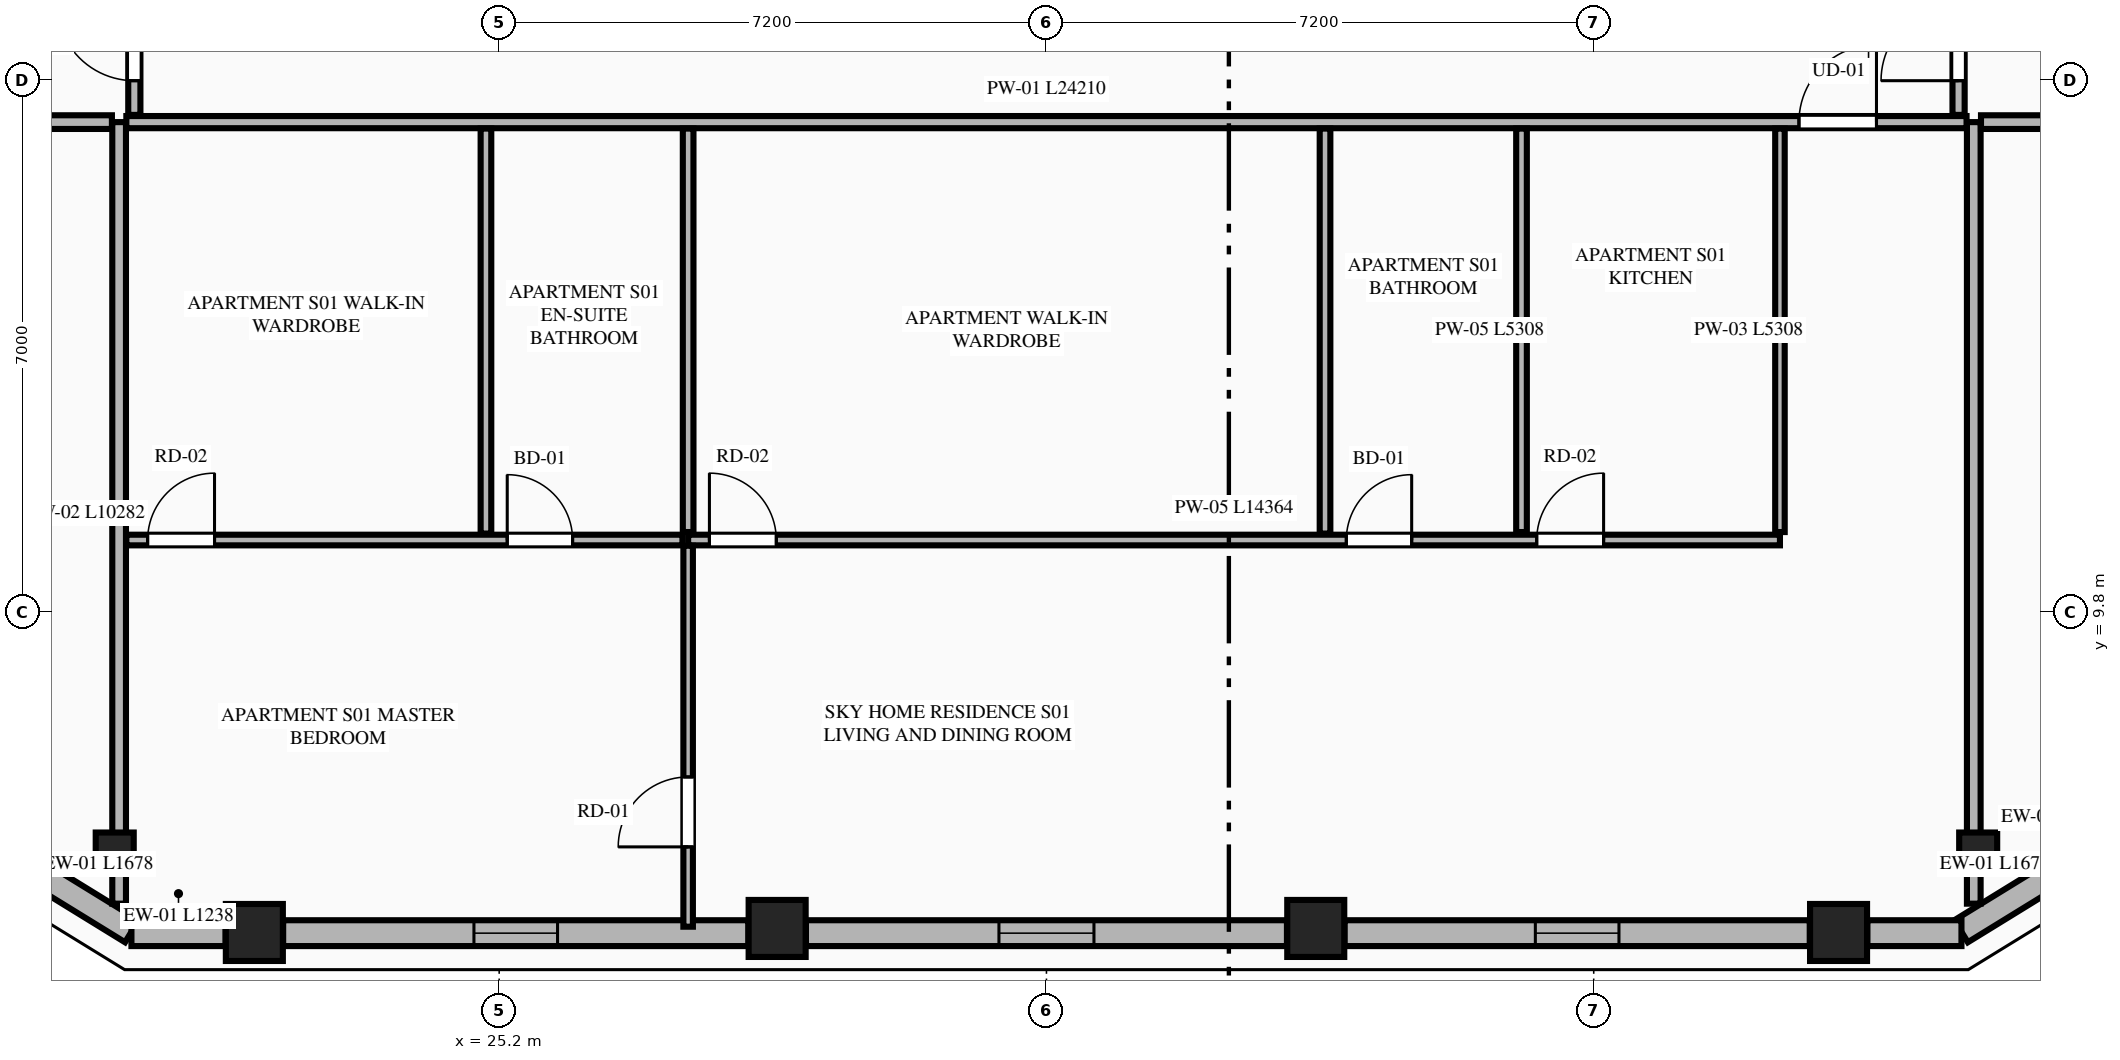
"""IFC4 building model, lengths in metres.
Left out: names, types, materials, properties, quantities, classifications, styles, units other than length and angle.
Written with IfcOpenShell. Run it as: python <this file> out.ifc"""

import sys

from ifc_helpers import new_model, si_unit, direction, frame, frame_2d, origin, origin_2d, place, context, subcontext, project, spatial, rectangle, extrude, element, fill, save


model = new_model("IFC4")
c1 = context("Model", 3, precision=1e-05, world=origin(), true_north=direction((0.0, 1.0)))
c2 = subcontext(c1, "Body", "Model", "MODEL_VIEW")
j1 = project(units=[si_unit("LENGTHUNIT", "METRE"), si_unit("PLANEANGLEUNIT", "RADIAN")], contexts=[c1])
p1 = place(None, origin())
s1 = spatial("IfcSite", under=j1, at=p1, CompositionType="ELEMENT")
p2 = place(p1, origin())
s2 = spatial("IfcBuilding", under=s1, at=p2, CompositionType="ELEMENT")
p3 = place(p2, frame((0.0, 0.0, 210.95)))
s3 = spatial("IfcBuildingStorey", under=s2, at=p3, CompositionType="ELEMENT", Elevation=210.95)
for number, where, z_axis, x_axis in (
    (1, (21.979, 5.589, 0.0), (0.0, 0.0, 1.0), (1.0, 0.0, 0.0)),
    (2, (28.857, 5.642, 0.0), (0.0, 0.0, 1.0), (1.0, 0.0, 0.0)),
    (3, (35.943, 5.642, 0.0), (0.0, 0.0, 1.0), (1.0, 0.0, 0.0)),
    (4, (42.821, 5.589, 0.0), (0.0, 0.0, 1.0), (1.0, 0.0, 0.0)),
):
    element("IfcColumn", number, at=place(p3, frame(where, z_axis=z_axis, x_axis=x_axis)), inside=s3, PredefinedType="COLUMN", context=c2, shape_type="SweptSolid", body=[
        extrude(rectangle(XDim=0.75, YDim=0.75, at=origin_2d()), origin(), (0.0, 0.0, 1.0), 3.55),
    ])
for number, where, z_axis, x_axis in (
    (5, (20.142, 6.654, 0.0), (0.0, 0.0, 1.0), (0.865, -0.501, 0.0)),
    (6, (44.658, 6.654, 0.0), (0.0, 0.0, 1.0), (0.865, 0.501, 0.0)),
):
    element("IfcColumn", number, at=place(p3, frame(where, z_axis=z_axis, x_axis=x_axis)), inside=s3, PredefinedType="PILASTER", context=c2, shape_type="SweptSolid", body=[
        extrude(rectangle(XDim=0.5, YDim=0.35, at=origin_2d()), origin(), (0.0, 0.0, 1.0), 3.55),
    ])
for number, where, z_axis, x_axis in (
    (7, (18.938, 6.484, 0.0), (0.0, 0.0, 1.0), (0.852, -0.524, 0.0)),
    (8, (44.433, 5.605, 0.0), (0.0, 0.0, 1.0), (0.852, 0.524, 0.0)),
):
    element("IfcWall", number, at=place(p3, frame(where, z_axis=z_axis, x_axis=x_axis)), inside=s3, PredefinedType="STANDARD", context=c2, shape_type="SweptSolid", body=[
        extrude(rectangle(XDim=1.678, YDim=0.34, at=frame_2d((0.839, 0.0))), origin(), (0.0, 0.0, 1.0), 3.35),
    ])
p4 = place(p3, frame((20.362, 5.58, 0.0), z_axis=(0.0, 0.0, 1.0), x_axis=(1.0, 0.0, 0.0)))
e9 = element("IfcWall", 9, at=p4, inside=s3, PredefinedType="STANDARD", context=c2, shape_type="SweptSolid", body=[
    extrude(rectangle(XDim=1.238, YDim=0.34, at=frame_2d((0.619, 0.0))), origin(), (0.0, 0.0, 1.0), 3.35),
])
p5 = place(p3, frame((22.358, 5.58, 0.0), z_axis=(0.0, 0.0, 1.0), x_axis=(1.0, 0.0, 0.0)))
e10 = element("IfcWall", 10, at=p5, inside=s3, PredefinedType="STANDARD", context=c2, shape_type="SweptSolid", body=[
    extrude(rectangle(XDim=6.12, YDim=0.34, at=frame_2d((3.06, 0.0))), origin(), (0.0, 0.0, 1.0), 2.883),
])
p6 = place(p5, frame((2.51, 0.0, 0.75)))
e11 = element("IfcOpeningElement", 11, at=p6, cuts=e10, PredefinedType="OPENING", context=c2, shape_type="SweptSolid", body=[
    extrude(rectangle(XDim=1.1, YDim=1.983, at=frame_2d((0.55, 0.991))), frame((0.0, 0.18, 0.0), z_axis=(0.0, -1.0, 0.0), x_axis=(1.0, 0.0, 0.0)), (0.0, 0.0, 1.0), 0.36),
])
p7 = place(p3, frame((29.236, 5.58, 0.0), z_axis=(0.0, 0.0, 1.0), x_axis=(1.0, 0.0, 0.0)))
e12 = element("IfcWall", 12, at=p7, inside=s3, PredefinedType="STANDARD", context=c2, shape_type="SweptSolid", body=[
    extrude(rectangle(XDim=6.328, YDim=0.34, at=frame_2d((3.164, 0.0))), origin(), (0.0, 0.0, 1.0), 2.883),
])
p8 = place(p7, frame((2.539, 0.0, 0.75)))
e13 = element("IfcOpeningElement", 13, at=p8, cuts=e12, PredefinedType="OPENING", context=c2, shape_type="SweptSolid", body=[
    extrude(rectangle(XDim=1.25, YDim=1.95, at=frame_2d((0.625, 0.975))), frame((0.0, 0.18, 0.0), z_axis=(0.0, -1.0, 0.0), x_axis=(1.0, 0.0, 0.0)), (0.0, 0.0, 1.0), 0.36),
])
p9 = place(p3, frame((36.322, 5.58, 0.0), z_axis=(0.0, 0.0, 1.0), x_axis=(1.0, 0.0, 0.0)))
e14 = element("IfcWall", 14, at=p9, inside=s3, PredefinedType="STANDARD", context=c2, shape_type="SweptSolid", body=[
    extrude(rectangle(XDim=6.12, YDim=0.34, at=frame_2d((3.06, 0.0))), origin(), (0.0, 0.0, 1.0), 2.883),
])
p10 = place(p9, frame((2.51, 0.0, 0.75)))
e15 = element("IfcOpeningElement", 15, at=p10, cuts=e14, PredefinedType="OPENING", context=c2, shape_type="SweptSolid", body=[
    extrude(rectangle(XDim=1.1, YDim=1.983, at=frame_2d((0.55, 0.991))), frame((0.0, 0.18, 0.0), z_axis=(0.0, -1.0, 0.0), x_axis=(1.0, 0.0, 0.0)), (0.0, 0.0, 1.0), 0.36),
])
p11 = place(p3, frame((43.2, 5.58, 0.0), z_axis=(0.0, 0.0, 1.0), x_axis=(1.0, 0.0, 0.0)))
e16 = element("IfcWall", 16, at=p11, inside=s3, PredefinedType="STANDARD", context=c2, shape_type="SweptSolid", body=[
    extrude(rectangle(XDim=1.238, YDim=0.34, at=frame_2d((0.619, 0.0))), origin(), (0.0, 0.0, 1.0), 3.35),
])
for number, where, z_axis, x_axis in (
    (17, (20.2, 5.968, 0.0), (0.0, 0.0, 1.0), (0.0, 1.0, 0.0)),
    (18, (44.6, 5.968, 0.0), (0.0, 0.0, 1.0), (0.0, 1.0, 0.0)),
):
    element("IfcWall", number, at=place(p3, frame(where, z_axis=z_axis, x_axis=x_axis)), inside=s3, PredefinedType="PARTITIONING", context=c2, shape_type="SweptSolid", body=[
        extrude(rectangle(XDim=10.282, YDim=0.18, at=frame_2d((5.141, 0.0))), origin(), (0.0, 0.0, 1.0), 3.35),
    ])
p12 = place(p3, frame((20.295, 16.25, 0.0), z_axis=(0.0, 0.0, 1.0), x_axis=(1.0, 0.0, 0.0)))
e19 = element("IfcWall", 19, at=p12, inside=s3, PredefinedType="PARTITIONING", context=c2, shape_type="SweptSolid", body=[
    extrude(rectangle(XDim=24.21, YDim=0.16, at=frame_2d((12.105, 0.0))), origin(), (0.0, 0.0, 1.0), 3.35),
])
p13 = place(p12, frame((22.005, 0.0, 0.0)))
e20 = element("IfcOpeningElement", 20, at=p13, cuts=e19, PredefinedType="OPENING", context=c2, shape_type="SweptSolid", body=[
    extrude(rectangle(XDim=1.02, YDim=2.25, at=frame_2d((0.51, 1.125))), frame((0.0, 0.09, 0.0), z_axis=(0.0, -1.0, 0.0), x_axis=(1.0, 0.0, 0.0)), (0.0, 0.0, 1.0), 0.18),
])
p14 = place(p3, frame((42.05, 10.857, 0.0), z_axis=(0.0, 0.0, 1.0), x_axis=(0.0, 1.0, 0.0)))
e21 = element("IfcWall", 21, at=p14, inside=s3, PredefinedType="PARTITIONING", context=c2, shape_type="SweptSolid", body=[
    extrude(rectangle(XDim=5.308, YDim=0.125, at=frame_2d((2.654, 0.0))), origin(), (0.0, 0.0, 1.0), 2.807),
])
p15 = place(p3, frame((27.686, 10.752, 0.0), z_axis=(0.0, 0.0, 1.0), x_axis=(1.0, 0.0, 0.0)))
e22 = element("IfcWall", 22, at=p15, inside=s3, PredefinedType="PLUMBINGWALL", context=c2, shape_type="SweptSolid", body=[
    extrude(rectangle(XDim=14.364, YDim=0.14, at=frame_2d((7.182, 0.0))), origin(), (0.0, 0.0, 1.0), 3.35),
])
p16 = place(p15, frame((0.28, 0.0, 0.0)))
e23 = element("IfcOpeningElement", 23, at=p16, cuts=e22, PredefinedType="OPENING", context=c2, shape_type="SweptSolid", body=[
    extrude(rectangle(XDim=0.88, YDim=2.15, at=frame_2d((0.44, 1.075))), frame((0.0, 0.08, 0.0), z_axis=(0.0, -1.0, 0.0), x_axis=(1.0, 0.0, 0.0)), (0.0, 0.0, 1.0), 0.16),
])
p17 = place(p15, frame((8.659, 0.0, 0.0)))
e24 = element("IfcOpeningElement", 24, at=p17, cuts=e22, PredefinedType="OPENING", context=c2, shape_type="SweptSolid", body=[
    extrude(rectangle(XDim=0.86, YDim=2.1, at=frame_2d((0.43, 1.05))), frame((0.0, 0.08, 0.0), z_axis=(0.0, -1.0, 0.0), x_axis=(1.0, 0.0, 0.0)), (0.0, 0.0, 1.0), 0.16),
])
p18 = place(p15, frame((11.164, 0.0, 0.0)))
e25 = element("IfcOpeningElement", 25, at=p18, cuts=e22, PredefinedType="OPENING", context=c2, shape_type="SweptSolid", body=[
    extrude(rectangle(XDim=0.88, YDim=2.15, at=frame_2d((0.44, 1.075))), frame((0.0, 0.08, 0.0), z_axis=(0.0, -1.0, 0.0), x_axis=(1.0, 0.0, 0.0)), (0.0, 0.0, 1.0), 0.16),
])
p19 = place(p3, frame((20.295, 10.752, 0.0), z_axis=(0.0, 0.0, 1.0), x_axis=(1.0, 0.0, 0.0)))
e26 = element("IfcWall", 26, at=p19, inside=s3, PredefinedType="PLUMBINGWALL", context=c2, shape_type="SweptSolid", body=[
    extrude(rectangle(XDim=7.316, YDim=0.14, at=frame_2d((3.658, 0.0))), origin(), (0.0, 0.0, 1.0), 3.35),
])
p20 = place(p19, frame((0.28, 0.0, 0.0)))
e27 = element("IfcOpeningElement", 27, at=p20, cuts=e26, PredefinedType="OPENING", context=c2, shape_type="SweptSolid", body=[
    extrude(rectangle(XDim=0.88, YDim=2.15, at=frame_2d((0.44, 1.075))), frame((0.0, 0.08, 0.0), z_axis=(0.0, -1.0, 0.0), x_axis=(1.0, 0.0, 0.0)), (0.0, 0.0, 1.0), 0.16),
])
p21 = place(p19, frame((5.011, 0.0, 0.0)))
e28 = element("IfcOpeningElement", 28, at=p21, cuts=e26, PredefinedType="OPENING", context=c2, shape_type="SweptSolid", body=[
    extrude(rectangle(XDim=0.86, YDim=2.1, at=frame_2d((0.43, 1.05))), frame((0.0, 0.08, 0.0), z_axis=(0.0, -1.0, 0.0), x_axis=(1.0, 0.0, 0.0)), (0.0, 0.0, 1.0), 0.16),
])
for number, where, z_axis, x_axis in (
    (29, (38.65, 10.857, 0.0), (0.0, 0.0, 1.0), (0.0, 1.0, 0.0)),
    (30, (27.686, 10.857, 0.0), (0.0, 0.0, 1.0), (0.0, 1.0, 0.0)),
):
    element("IfcWall", number, at=place(p3, frame(where, z_axis=z_axis, x_axis=x_axis)), inside=s3, PredefinedType="PLUMBINGWALL", context=c2, shape_type="SweptSolid", body=[
        extrude(rectangle(XDim=5.308, YDim=0.14, at=frame_2d((2.654, 0.0))), origin(), (0.0, 0.0, 1.0), 3.35),
    ])
p22 = place(p3, frame((27.686, 5.665, 0.0), z_axis=(0.0, 0.0, 1.0), x_axis=(0.0, 1.0, 0.0)))
e31 = element("IfcWall", 31, at=p22, inside=s3, PredefinedType="PARTITIONING", context=c2, shape_type="SweptSolid", body=[
    extrude(rectangle(XDim=5.012, YDim=0.125, at=frame_2d((2.506, 0.0))), origin(), (0.0, 0.0, 1.0), 3.35),
])
p23 = place(p22, frame((1.05, 0.0, 0.0)))
e32 = element("IfcOpeningElement", 32, at=p23, cuts=e31, PredefinedType="OPENING", context=c2, shape_type="SweptSolid", body=[
    extrude(rectangle(XDim=0.92, YDim=2.15, at=frame_2d((0.46, 1.075))), frame((0.0, 0.073, 0.0), z_axis=(0.0, -1.0, 0.0), x_axis=(1.0, 0.0, 0.0)), (0.0, 0.0, 1.0), 0.145),
])
p24 = place(p3, frame((36.065, 10.837, 0.0), z_axis=(0.0, 0.0, 1.0), x_axis=(0.0, 1.0, 0.0)))
e33 = element("IfcWall", 33, at=p24, inside=s3, PredefinedType="PLUMBINGWALL", context=c2, shape_type="SweptSolid", body=[
    extrude(rectangle(XDim=5.328, YDim=0.14, at=frame_2d((2.664, 0.0))), origin(), (0.0, 0.0, 1.0), 2.807),
])
p25 = place(p3, frame((25.026, 10.837, 0.0), z_axis=(0.0, 0.0, 1.0), x_axis=(0.0, 1.0, 0.0)))
e34 = element("IfcWall", 34, at=p25, inside=s3, PredefinedType="PLUMBINGWALL", context=c2, shape_type="SweptSolid", body=[
    extrude(rectangle(XDim=5.328, YDim=0.14, at=frame_2d((2.664, 0.0))), origin(), (0.0, 0.0, 1.0), 3.35),
])
for number, where, z_axis, x_axis in (
    (35, (14.211, 16.25, 0.0), (0.0, 0.0, 1.0), (1.0, 0.0, 0.0)),
    (36, (44.695, 16.25, 0.0), (0.0, 0.0, 1.0), (1.0, 0.0, 0.0)),
):
    element("IfcWall", number, at=place(p3, frame(where, z_axis=z_axis, x_axis=x_axis)), inside=s3, PredefinedType="PARTITIONING", context=c2, shape_type="SweptSolid", body=[
        extrude(rectangle(XDim=5.894, YDim=0.18, at=frame_2d((2.947, 0.0))), origin(), (0.0, 0.0, 1.0), 3.35),
    ])
p26 = place(p3, frame((20.4, 16.345, 0.0), z_axis=(0.0, 0.0, 1.0), x_axis=(0.0, 1.0, 0.0)))
e37 = element("IfcWall", 37, at=p26, inside=s3, PredefinedType="PARTITIONING", context=c2, shape_type="SweptSolid", body=[
    extrude(rectangle(XDim=18.71, YDim=0.16, at=frame_2d((9.355, 0.0))), origin(), (0.0, 0.0, 1.0), 3.35),
])
p27 = place(p26, frame((0.45, 0.0, 0.0)))
e38 = element("IfcOpeningElement", 38, at=p27, cuts=e37, PredefinedType="OPENING", context=c2, shape_type="SweptSolid", body=[
    extrude(rectangle(XDim=1.02, YDim=2.25, at=frame_2d((0.51, 1.125))), frame((0.0, 0.09, 0.0), z_axis=(0.0, -1.0, 0.0), x_axis=(1.0, 0.0, 0.0)), (0.0, 0.0, 1.0), 0.18),
])
p28 = place(p3, frame((44.4, 16.345, 0.0), z_axis=(0.0, 0.0, 1.0), x_axis=(0.0, 1.0, 0.0)))
e39 = element("IfcWall", 39, at=p28, inside=s3, PredefinedType="PARTITIONING", context=c2, shape_type="SweptSolid", body=[
    extrude(rectangle(XDim=18.71, YDim=0.16, at=frame_2d((9.355, 0.0))), origin(), (0.0, 0.0, 1.0), 3.35),
])
p29 = place(p28, frame((0.45, 0.0, 0.0)))
e40 = element("IfcOpeningElement", 40, at=p29, cuts=e39, PredefinedType="OPENING", context=c2, shape_type="SweptSolid", body=[
    extrude(rectangle(XDim=1.02, YDim=2.25, at=frame_2d((0.51, 1.125))), frame((0.0, 0.09, 0.0), z_axis=(0.0, -1.0, 0.0), x_axis=(1.0, 0.0, 0.0)), (0.0, 0.0, 1.0), 0.18),
])
p30 = place(p6, origin())
e41 = element("IfcWindow", 41, at=p30, inside=s3, PartitioningType="SINGLE_PANEL", PredefinedType="WINDOW", context=c2, shape_type="SweptSolid", body=[
    extrude(rectangle(XDim=1.1, YDim=1.983, at=frame_2d((0.55, 0.991))), frame((0.0, 0.03, 0.0), z_axis=(0.0, -1.0, 0.0), x_axis=(1.0, 0.0, 0.0)), (0.0, 0.0, 1.0), 0.06),
])
fill(e11, e41)
p31 = place(p8, origin())
e42 = element("IfcWindow", 42, at=p31, inside=s3, PartitioningType="SINGLE_PANEL", PredefinedType="WINDOW", context=c2, shape_type="SweptSolid", body=[
    extrude(rectangle(XDim=1.25, YDim=1.95, at=frame_2d((0.625, 0.975))), frame((0.0, 0.03, 0.0), z_axis=(0.0, -1.0, 0.0), x_axis=(1.0, 0.0, 0.0)), (0.0, 0.0, 1.0), 0.06),
])
fill(e13, e42)
p32 = place(p10, origin())
e43 = element("IfcWindow", 43, at=p32, inside=s3, PartitioningType="SINGLE_PANEL", PredefinedType="WINDOW", context=c2, shape_type="SweptSolid", body=[
    extrude(rectangle(XDim=1.1, YDim=1.983, at=frame_2d((0.55, 0.991))), frame((0.0, 0.03, 0.0), z_axis=(0.0, -1.0, 0.0), x_axis=(1.0, 0.0, 0.0)), (0.0, 0.0, 1.0), 0.06),
])
fill(e15, e43)
p33 = place(p16, origin())
e44 = element("IfcDoor", 44, at=p33, inside=s3, OperationType="SINGLE_SWING_LEFT", PredefinedType="DOOR", context=c2, shape_type="SweptSolid", body=[
    extrude(rectangle(XDim=0.88, YDim=2.15, at=frame_2d((0.44, 1.075))), frame((0.0, 0.025, 0.0), z_axis=(0.0, -1.0, 0.0), x_axis=(1.0, 0.0, 0.0)), (0.0, 0.0, 1.0), 0.05),
])
fill(e23, e44)
p34 = place(p17, origin())
e45 = element("IfcDoor", 45, at=p34, inside=s3, OperationType="SINGLE_SWING_RIGHT", PredefinedType="DOOR", context=c2, shape_type="SweptSolid", body=[
    extrude(rectangle(XDim=0.86, YDim=2.1, at=frame_2d((0.43, 1.05))), frame((0.0, 0.025, 0.0), z_axis=(0.0, -1.0, 0.0), x_axis=(1.0, 0.0, 0.0)), (0.0, 0.0, 1.0), 0.05),
])
fill(e24, e45)
p35 = place(p20, origin())
e46 = element("IfcDoor", 46, at=p35, inside=s3, OperationType="SINGLE_SWING_RIGHT", PredefinedType="DOOR", context=c2, shape_type="SweptSolid", body=[
    extrude(rectangle(XDim=0.88, YDim=2.15, at=frame_2d((0.44, 1.075))), frame((0.0, 0.025, 0.0), z_axis=(0.0, -1.0, 0.0), x_axis=(1.0, 0.0, 0.0)), (0.0, 0.0, 1.0), 0.05),
])
fill(e27, e46)
p36 = place(p21, origin())
e47 = element("IfcDoor", 47, at=p36, inside=s3, OperationType="SINGLE_SWING_LEFT", PredefinedType="DOOR", context=c2, shape_type="SweptSolid", body=[
    extrude(rectangle(XDim=0.86, YDim=2.1, at=frame_2d((0.43, 1.05))), frame((0.0, 0.025, 0.0), z_axis=(0.0, -1.0, 0.0), x_axis=(1.0, 0.0, 0.0)), (0.0, 0.0, 1.0), 0.05),
])
fill(e28, e47)
p37 = place(p13, origin())
e48 = element("IfcDoor", 48, at=p37, inside=s3, OperationType="SINGLE_SWING_RIGHT", PredefinedType="DOOR", context=c2, shape_type="SweptSolid", body=[
    extrude(rectangle(XDim=1.02, YDim=2.25, at=frame_2d((0.51, 1.125))), frame((0.0, 0.025, 0.0), z_axis=(0.0, -1.0, 0.0), x_axis=(1.0, 0.0, 0.0)), (0.0, 0.0, 1.0), 0.05),
])
fill(e20, e48)
p38 = place(p18, origin())
e49 = element("IfcDoor", 49, at=p38, inside=s3, OperationType="SINGLE_SWING_RIGHT", PredefinedType="DOOR", context=c2, shape_type="SweptSolid", body=[
    extrude(rectangle(XDim=0.88, YDim=2.15, at=frame_2d((0.44, 1.075))), frame((0.0, 0.025, 0.0), z_axis=(0.0, -1.0, 0.0), x_axis=(1.0, 0.0, 0.0)), (0.0, 0.0, 1.0), 0.05),
])
fill(e25, e49)
p39 = place(p23, origin())
e50 = element("IfcDoor", 50, at=p39, inside=s3, OperationType="SINGLE_SWING_LEFT", PredefinedType="DOOR", context=c2, shape_type="SweptSolid", body=[
    extrude(rectangle(XDim=0.92, YDim=2.15, at=frame_2d((0.46, 1.075))), frame((0.0, 0.025, 0.0), z_axis=(0.0, -1.0, 0.0), x_axis=(1.0, 0.0, 0.0)), (0.0, 0.0, 1.0), 0.05),
])
fill(e32, e50)
p40 = place(p27, origin())
e51 = element("IfcDoor", 51, at=p40, inside=s3, OperationType="SINGLE_SWING_RIGHT", PredefinedType="DOOR", context=c2, shape_type="SweptSolid", body=[
    extrude(rectangle(XDim=1.02, YDim=2.25, at=frame_2d((0.51, 1.125))), frame((0.0, 0.025, 0.0), z_axis=(0.0, -1.0, 0.0), x_axis=(1.0, 0.0, 0.0)), (0.0, 0.0, 1.0), 0.05),
])
fill(e38, e51)
p41 = place(p29, origin())
e52 = element("IfcDoor", 52, at=p41, inside=s3, OperationType="SINGLE_SWING_LEFT", PredefinedType="DOOR", context=c2, shape_type="SweptSolid", body=[
    extrude(rectangle(XDim=1.02, YDim=2.25, at=frame_2d((0.51, 1.125))), frame((0.0, 0.025, 0.0), z_axis=(0.0, -1.0, 0.0), x_axis=(1.0, 0.0, 0.0)), (0.0, 0.0, 1.0), 0.05),
])
fill(e40, e52)
save(model, sys.argv[1])
